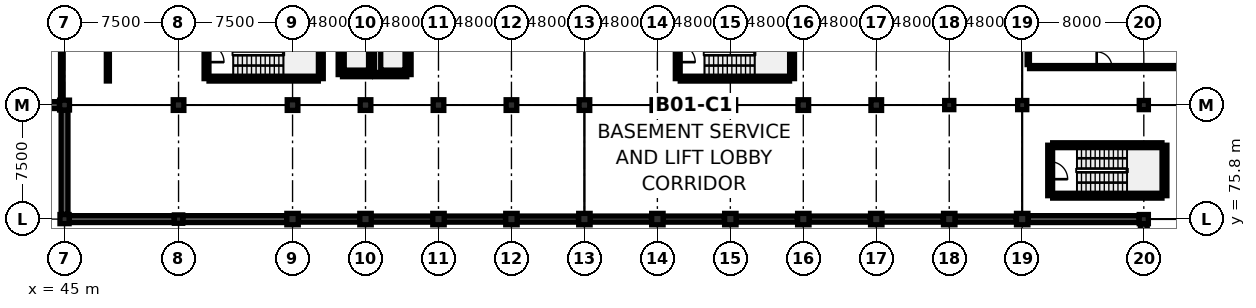
"""IFC4 building model, lengths in metres.
Left out: names, types, materials, properties, quantities, classifications, styles, units other than length and angle.
Written with IfcOpenShell. Run it as: python <this file> out.ifc"""

import sys

from ifc_helpers import new_model, si_unit, direction, frame, frame_2d, origin, origin_2d, place, context, subcontext, project, spatial, rectangle, circle, extrude, element, fill, save


model = new_model("IFC4")
c1 = context("Model", 3, precision=1e-05, world=origin(), true_north=direction((0.0, 1.0)))
c2 = subcontext(c1, "Body", "Model", "MODEL_VIEW")
j1 = project(units=[si_unit("LENGTHUNIT", "METRE"), si_unit("PLANEANGLEUNIT", "RADIAN")], contexts=[c1])
p1 = place(None, origin())
s1 = spatial("IfcSite", under=j1, at=p1, CompositionType="ELEMENT")
p2 = place(p1, origin())
s2 = spatial("IfcBuilding", under=s1, at=p2, CompositionType="ELEMENT")
p3 = place(p2, frame((0.0, 0.0, -4.2)))
s3 = spatial("IfcBuildingStorey", under=s2, at=p3, CompositionType="ELEMENT", Elevation=-4.2)
p4 = place(p3, frame((45.0, 75.8, 0.0), z_axis=(0.0, 0.0, 1.0), x_axis=(1.0, 0.0, 0.0)))
e1 = element("IfcColumn", 1, at=p4, inside=s3, PredefinedType="COLUMN", context=c2, shape_type="SweptSolid", body=[
    extrude(rectangle(XDim=0.6, YDim=0.6, at=origin_2d()), origin(), (0.0, 0.0, 1.0), 3.78),
])
p5 = place(p3, frame((45.0, 83.3, 0.0), z_axis=(0.0, 0.0, 1.0), x_axis=(1.0, 0.0, 0.0)))
e2 = element("IfcColumn", 2, at=p5, inside=s3, PredefinedType="COLUMN", context=c2, shape_type="SweptSolid", body=[
    extrude(rectangle(XDim=0.65, YDim=0.65, at=origin_2d()), origin(), (0.0, 0.0, 1.0), 3.78),
])
p6 = place(p3, frame((52.5, 75.8, 0.0), z_axis=(0.0, 0.0, 1.0), x_axis=(1.0, 0.0, 0.0)))
e3 = element("IfcColumn", 3, at=p6, inside=s3, PredefinedType="COLUMN", context=c2, shape_type="SweptSolid", body=[
    extrude(rectangle(XDim=0.55, YDim=0.55, at=origin_2d()), origin(), (0.0, 0.0, 1.0), 3.78),
])
p7 = place(p3, frame((52.5, 83.3, 0.0), z_axis=(0.0, 0.0, 1.0), x_axis=(1.0, 0.0, 0.0)))
e4 = element("IfcColumn", 4, at=p7, inside=s3, PredefinedType="COLUMN", context=c2, shape_type="SweptSolid", body=[
    extrude(rectangle(XDim=0.7, YDim=0.7, at=origin_2d()), origin(), (0.0, 0.0, 1.0), 3.78),
])
p8 = place(p3, frame((60.0, 75.8, 0.0), z_axis=(0.0, 0.0, 1.0), x_axis=(1.0, 0.0, 0.0)))
e5 = element("IfcColumn", 5, at=p8, inside=s3, PredefinedType="COLUMN", context=c2, shape_type="SweptSolid", body=[
    extrude(circle(Radius=0.375, at=origin_2d()), origin(), (0.0, 0.0, 1.0), 3.78),
])
p9 = place(p3, frame((60.0, 83.3, 0.0), z_axis=(0.0, 0.0, 1.0), x_axis=(1.0, 0.0, 0.0)))
e6 = element("IfcColumn", 6, at=p9, inside=s3, PredefinedType="COLUMN", context=c2, shape_type="SweptSolid", body=[
    extrude(rectangle(XDim=0.7, YDim=0.7, at=origin_2d()), origin(), (0.0, 0.0, 1.0), 3.78),
])
p10 = place(p3, frame((64.8, 75.8, 0.0), z_axis=(0.0, 0.0, 1.0), x_axis=(1.0, 0.0, 0.0)))
e7 = element("IfcColumn", 7, at=p10, inside=s3, PredefinedType="COLUMN", context=c2, shape_type="SweptSolid", body=[
    extrude(circle(Radius=0.375, at=origin_2d()), origin(), (0.0, 0.0, 1.0), 3.78),
])
p11 = place(p3, frame((64.8, 83.3, 0.0), z_axis=(0.0, 0.0, 1.0), x_axis=(1.0, 0.0, 0.0)))
e8 = element("IfcColumn", 8, at=p11, inside=s3, PredefinedType="COLUMN", context=c2, shape_type="SweptSolid", body=[
    extrude(rectangle(XDim=0.7, YDim=0.7, at=origin_2d()), origin(), (0.0, 0.0, 1.0), 3.78),
])
p12 = place(p3, frame((69.6, 75.8, 0.0), z_axis=(0.0, 0.0, 1.0), x_axis=(1.0, 0.0, 0.0)))
e9 = element("IfcColumn", 9, at=p12, inside=s3, PredefinedType="COLUMN", context=c2, shape_type="SweptSolid", body=[
    extrude(circle(Radius=0.375, at=origin_2d()), origin(), (0.0, 0.0, 1.0), 3.78),
])
p13 = place(p3, frame((69.6, 83.3, 0.0), z_axis=(0.0, 0.0, 1.0), x_axis=(1.0, 0.0, 0.0)))
e10 = element("IfcColumn", 10, at=p13, inside=s3, PredefinedType="COLUMN", context=c2, shape_type="SweptSolid", body=[
    extrude(rectangle(XDim=0.7, YDim=0.7, at=origin_2d()), origin(), (0.0, 0.0, 1.0), 3.78),
])
p14 = place(p3, frame((74.4, 75.8, 0.0), z_axis=(0.0, 0.0, 1.0), x_axis=(1.0, 0.0, 0.0)))
e11 = element("IfcColumn", 11, at=p14, inside=s3, PredefinedType="COLUMN", context=c2, shape_type="SweptSolid", body=[
    extrude(circle(Radius=0.375, at=origin_2d()), origin(), (0.0, 0.0, 1.0), 3.78),
])
p15 = place(p3, frame((74.4, 83.3, 0.0), z_axis=(0.0, 0.0, 1.0), x_axis=(1.0, 0.0, 0.0)))
e12 = element("IfcColumn", 12, at=p15, inside=s3, PredefinedType="COLUMN", context=c2, shape_type="SweptSolid", body=[
    extrude(rectangle(XDim=0.7, YDim=0.7, at=origin_2d()), origin(), (0.0, 0.0, 1.0), 3.78),
])
p16 = place(p3, frame((79.2, 75.8, 0.0), z_axis=(0.0, 0.0, 1.0), x_axis=(1.0, 0.0, 0.0)))
e13 = element("IfcColumn", 13, at=p16, inside=s3, PredefinedType="COLUMN", context=c2, shape_type="SweptSolid", body=[
    extrude(circle(Radius=0.375, at=origin_2d()), origin(), (0.0, 0.0, 1.0), 3.78),
])
p17 = place(p3, frame((79.2, 83.3, 0.0), z_axis=(0.0, 0.0, 1.0), x_axis=(1.0, 0.0, 0.0)))
e14 = element("IfcColumn", 14, at=p17, inside=s3, PredefinedType="COLUMN", context=c2, shape_type="SweptSolid", body=[
    extrude(rectangle(XDim=0.7, YDim=0.7, at=origin_2d()), origin(), (0.0, 0.0, 1.0), 3.78),
])
p18 = place(p3, frame((84.0, 75.8, 0.0), z_axis=(0.0, 0.0, 1.0), x_axis=(1.0, 0.0, 0.0)))
e15 = element("IfcColumn", 15, at=p18, inside=s3, PredefinedType="COLUMN", context=c2, shape_type="SweptSolid", body=[
    extrude(circle(Radius=0.375, at=origin_2d()), origin(), (0.0, 0.0, 1.0), 3.78),
])
p19 = place(p3, frame((84.0, 83.3, 0.0), z_axis=(0.0, 0.0, 1.0), x_axis=(1.0, 0.0, 0.0)))
e16 = element("IfcColumn", 16, at=p19, inside=s3, PredefinedType="COLUMN", context=c2, shape_type="SweptSolid", body=[
    extrude(rectangle(XDim=0.7, YDim=0.7, at=origin_2d()), origin(), (0.0, 0.0, 1.0), 3.78),
])
p20 = place(p3, frame((88.8, 75.8, 0.0), z_axis=(0.0, 0.0, 1.0), x_axis=(1.0, 0.0, 0.0)))
e17 = element("IfcColumn", 17, at=p20, inside=s3, PredefinedType="COLUMN", context=c2, shape_type="SweptSolid", body=[
    extrude(circle(Radius=0.375, at=origin_2d()), origin(), (0.0, 0.0, 1.0), 3.78),
])
p21 = place(p3, frame((88.8, 83.3, 0.0), z_axis=(0.0, 0.0, 1.0), x_axis=(1.0, 0.0, 0.0)))
e18 = element("IfcColumn", 18, at=p21, inside=s3, PredefinedType="COLUMN", context=c2, shape_type="SweptSolid", body=[
    extrude(rectangle(XDim=0.7, YDim=0.7, at=origin_2d()), origin(), (0.0, 0.0, 1.0), 3.78),
])
p22 = place(p3, frame((93.6, 75.8, 0.0), z_axis=(0.0, 0.0, 1.0), x_axis=(1.0, 0.0, 0.0)))
e19 = element("IfcColumn", 19, at=p22, inside=s3, PredefinedType="COLUMN", context=c2, shape_type="SweptSolid", body=[
    extrude(circle(Radius=0.375, at=origin_2d()), origin(), (0.0, 0.0, 1.0), 3.78),
])
p23 = place(p3, frame((93.6, 83.3, 0.0), z_axis=(0.0, 0.0, 1.0), x_axis=(1.0, 0.0, 0.0)))
e20 = element("IfcColumn", 20, at=p23, inside=s3, PredefinedType="COLUMN", context=c2, shape_type="SweptSolid", body=[
    extrude(rectangle(XDim=0.7, YDim=0.7, at=origin_2d()), origin(), (0.0, 0.0, 1.0), 3.78),
])
p24 = place(p3, frame((98.4, 75.8, 0.0), z_axis=(0.0, 0.0, 1.0), x_axis=(1.0, 0.0, 0.0)))
e21 = element("IfcColumn", 21, at=p24, inside=s3, PredefinedType="COLUMN", context=c2, shape_type="SweptSolid", body=[
    extrude(circle(Radius=0.375, at=origin_2d()), origin(), (0.0, 0.0, 1.0), 3.78),
])
p25 = place(p3, frame((98.4, 83.3, 0.0), z_axis=(0.0, 0.0, 1.0), x_axis=(1.0, 0.0, 0.0)))
e22 = element("IfcColumn", 22, at=p25, inside=s3, PredefinedType="COLUMN", context=c2, shape_type="SweptSolid", body=[
    extrude(rectangle(XDim=0.7, YDim=0.7, at=origin_2d()), origin(), (0.0, 0.0, 1.0), 3.78),
])
p26 = place(p3, frame((103.2, 75.8, 0.0), z_axis=(0.0, 0.0, 1.0), x_axis=(1.0, 0.0, 0.0)))
e23 = element("IfcColumn", 23, at=p26, inside=s3, PredefinedType="COLUMN", context=c2, shape_type="SweptSolid", body=[
    extrude(circle(Radius=0.375, at=origin_2d()), origin(), (0.0, 0.0, 1.0), 3.78),
])
p27 = place(p3, frame((103.2, 83.3, 0.0), z_axis=(0.0, 0.0, 1.0), x_axis=(1.0, 0.0, 0.0)))
e24 = element("IfcColumn", 24, at=p27, inside=s3, PredefinedType="COLUMN", context=c2, shape_type="SweptSolid", body=[
    extrude(rectangle(XDim=0.6, YDim=0.6, at=origin_2d()), origin(), (0.0, 0.0, 1.0), 3.78),
])
p28 = place(p3, frame((108.0, 75.8, 0.0), z_axis=(0.0, 0.0, 1.0), x_axis=(1.0, 0.0, 0.0)))
e25 = element("IfcColumn", 25, at=p28, inside=s3, PredefinedType="COLUMN", context=c2, shape_type="SweptSolid", body=[
    extrude(circle(Radius=0.375, at=origin_2d()), origin(), (0.0, 0.0, 1.0), 3.78),
])
for number, where, z_axis, x_axis in (
    (26, (108.0, 83.3, 0.0), (0.0, 0.0, 1.0), (1.0, 0.0, 0.0)),
    (27, (116.0, 75.8, 0.0), (0.0, 0.0, 1.0), (1.0, 0.0, 0.0)),
):
    element("IfcColumn", number, at=place(p3, frame(where, z_axis=z_axis, x_axis=x_axis)), inside=s3, PredefinedType="COLUMN", context=c2, shape_type="SweptSolid", body=[
        extrude(rectangle(XDim=0.6, YDim=0.6, at=origin_2d()), origin(), (0.0, 0.0, 1.0), 3.78),
    ])
p29 = place(p3, frame((116.0, 83.3, 0.0), z_axis=(0.0, 0.0, 1.0), x_axis=(1.0, 0.0, 0.0)))
e28 = element("IfcColumn", 28, at=p29, inside=s3, PredefinedType="COLUMN", context=c2, shape_type="SweptSolid", body=[
    extrude(rectangle(XDim=0.6, YDim=0.6, at=origin_2d()), origin(), (0.0, 0.0, 1.0), 3.75),
])
p30 = place(p3, frame((116.0, 68.585, 0.0), z_axis=(0.0, 0.0, 1.0), x_axis=(0.0, 1.0, 0.0)))
e29 = element("IfcWall", 29, at=p30, inside=s3, PredefinedType="USERDEFINED", context=c2, shape_type="SweptSolid", body=[
    extrude(rectangle(XDim=6.905, YDim=0.45, at=frame_2d((3.453, 0.0))), origin(), (0.0, 0.0, 1.0), 3.13),
])
p31 = place(p3, frame((115.69, 75.8, 0.0), z_axis=(0.0, 0.0, 1.0), x_axis=(-1.0, 0.0, 0.0)))
e30 = element("IfcWall", 30, at=p31, inside=s3, PredefinedType="USERDEFINED", context=c2, shape_type="SweptSolid", body=[
    extrude(rectangle(XDim=7.305, YDim=0.45, at=frame_2d((3.652, 0.0))), origin(), (0.0, 0.0, 1.0), 3.08),
])
for number, where, z_axis, x_axis in (
    (31, (107.615, 75.8, 0.0), (0.0, 0.0, 1.0), (-1.0, 0.0, 0.0)),
    (32, (102.815, 75.8, 0.0), (0.0, 0.0, 1.0), (-1.0, 0.0, 0.0)),
):
    element("IfcWall", number, at=place(p3, frame(where, z_axis=z_axis, x_axis=x_axis)), inside=s3, PredefinedType="USERDEFINED", context=c2, shape_type="SweptSolid", body=[
        extrude(rectangle(XDim=4.03, YDim=0.4, at=frame_2d((2.015, 0.0))), origin(), (0.0, 0.0, 1.0), 3.18),
    ])
p32 = place(p3, frame((98.015, 75.8, 0.0), z_axis=(0.0, 0.0, 1.0), x_axis=(-1.0, 0.0, 0.0)))
e33 = element("IfcWall", 33, at=p32, inside=s3, PredefinedType="USERDEFINED", context=c2, shape_type="SweptSolid", body=[
    extrude(rectangle(XDim=4.03, YDim=0.4, at=frame_2d((2.015, 0.0))), origin(), (0.0, 0.0, 1.0), 3.18),
])
for number, where, z_axis, x_axis in (
    (34, (93.215, 75.8, 0.0), (0.0, 0.0, 1.0), (-1.0, 0.0, 0.0)),
    (35, (88.415, 75.8, 0.0), (0.0, 0.0, 1.0), (-1.0, 0.0, 0.0)),
    (36, (83.615, 75.8, 0.0), (0.0, 0.0, 1.0), (-1.0, 0.0, 0.0)),
    (37, (78.815, 75.8, 0.0), (0.0, 0.0, 1.0), (-1.0, 0.0, 0.0)),
):
    element("IfcWall", number, at=place(p3, frame(where, z_axis=z_axis, x_axis=x_axis)), inside=s3, PredefinedType="USERDEFINED", context=c2, shape_type="SweptSolid", body=[
        extrude(rectangle(XDim=4.03, YDim=0.4, at=frame_2d((2.015, 0.0))), origin(), (0.0, 0.0, 1.0), 3.18),
    ])
p33 = place(p3, frame((74.015, 75.8, 0.0), z_axis=(0.0, 0.0, 1.0), x_axis=(-1.0, 0.0, 0.0)))
e38 = element("IfcWall", 38, at=p33, inside=s3, PredefinedType="USERDEFINED", context=c2, shape_type="SweptSolid", body=[
    extrude(rectangle(XDim=4.03, YDim=0.4, at=frame_2d((2.015, 0.0))), origin(), (0.0, 0.0, 1.0), 3.18),
])
for number, where, z_axis, x_axis in (
    (39, (69.215, 75.8, 0.0), (0.0, 0.0, 1.0), (-1.0, 0.0, 0.0)),
    (40, (64.415, 75.8, 0.0), (0.0, 0.0, 1.0), (-1.0, 0.0, 0.0)),
):
    element("IfcWall", number, at=place(p3, frame(where, z_axis=z_axis, x_axis=x_axis)), inside=s3, PredefinedType="USERDEFINED", context=c2, shape_type="SweptSolid", body=[
        extrude(rectangle(XDim=4.03, YDim=0.4, at=frame_2d((2.015, 0.0))), origin(), (0.0, 0.0, 1.0), 3.18),
    ])
p34 = place(p3, frame((59.615, 75.8, 0.0), z_axis=(0.0, 0.0, 1.0), x_axis=(-1.0, 0.0, 0.0)))
e41 = element("IfcWall", 41, at=p34, inside=s3, PredefinedType="USERDEFINED", context=c2, shape_type="SweptSolid", body=[
    extrude(rectangle(XDim=6.83, YDim=0.45, at=frame_2d((3.415, 0.0))), origin(), (0.0, 0.0, 1.0), 3.13),
])
p35 = place(p3, frame((52.215, 75.8, 0.0), z_axis=(0.0, 0.0, 1.0), x_axis=(-1.0, 0.0, 0.0)))
e42 = element("IfcWall", 42, at=p35, inside=s3, PredefinedType="USERDEFINED", context=c2, shape_type="SweptSolid", body=[
    extrude(rectangle(XDim=6.905, YDim=0.45, at=frame_2d((3.453, 0.0))), origin(), (0.0, 0.0, 1.0), 3.13),
])
p36 = place(p3, frame((45.0, 76.11, 0.0), z_axis=(0.0, 0.0, 1.0), x_axis=(0.0, 1.0, 0.0)))
e43 = element("IfcWall", 43, at=p36, inside=s3, PredefinedType="USERDEFINED", context=c2, shape_type="SweptSolid", body=[
    extrude(rectangle(XDim=6.855, YDim=0.45, at=frame_2d((3.427, 0.0))), origin(), (0.0, 0.0, 1.0), 3.13),
])
p37 = place(p3, frame((44.665, 83.3, 0.0), z_axis=(0.0, 0.0, 1.0), x_axis=(-1.0, 0.0, 0.0)))
e44 = element("IfcWall", 44, at=p37, inside=s3, PredefinedType="USERDEFINED", context=c2, shape_type="SweptSolid", body=[
    extrude(rectangle(XDim=6.88, YDim=0.45, at=frame_2d((3.44, 0.0))), origin(), (0.0, 0.0, 1.0), 3.13),
])
p38 = place(p3, frame((54.505, 85.04, 0.0), z_axis=(0.0, 0.0, 1.0), x_axis=(1.0, 0.0, 0.0)))
e45 = element("IfcWall", 45, at=p38, inside=s3, PredefinedType="SHEAR", context=c2, shape_type="SweptSolid", body=[
    extrude(rectangle(XDim=7.19, YDim=0.32, at=frame_2d((3.595, 0.0))), origin(), (0.0, 0.0, 1.0), 3.78),
])
p39 = place(p3, frame((61.86, 85.04, 0.0), z_axis=(0.0, 0.0, 1.0), x_axis=(0.0, 1.0, 0.0)))
e46 = element("IfcWall", 46, at=p39, inside=s3, PredefinedType="SHEAR", context=c2, shape_type="SweptSolid", body=[
    extrude(rectangle(XDim=3.32, YDim=0.32, at=frame_2d((1.66, 0.0))), origin(), (0.0, 0.0, 1.0), 3.78),
])
p40 = place(p3, frame((54.34, 88.36, 0.0), z_axis=(0.0, 0.0, 1.0), x_axis=(0.0, -1.0, 0.0)))
e47 = element("IfcWall", 47, at=p40, inside=s3, PredefinedType="SHEAR", context=c2, shape_type="SweptSolid", body=[
    extrude(rectangle(XDim=3.32, YDim=0.32, at=frame_2d((1.66, 0.0))), origin(), (0.0, 0.0, 1.0), 3.78),
])
p41 = place(p40, frame((1.085, 0.0, 0.0)))
e48 = element("IfcOpeningElement", 48, at=p41, cuts=e47, PredefinedType="OPENING", context=c2, shape_type="SweptSolid", body=[
    extrude(rectangle(XDim=1.15, YDim=2.15, at=frame_2d((0.575, 1.075))), frame((0.0, 0.172, 0.0), z_axis=(0.0, -1.0, 0.0), x_axis=(1.0, 0.0, 0.0)), (0.0, 0.0, 1.0), 0.344),
])
p42 = place(p3, frame((63.286, 85.307, 0.0), z_axis=(0.0, 0.0, 1.0), x_axis=(1.0, 0.0, 0.0)))
e49 = element("IfcWall", 49, at=p42, inside=s3, PredefinedType="SHEAR", context=c2, shape_type="SweptSolid", body=[
    extrude(rectangle(XDim=1.828, YDim=0.28, at=frame_2d((0.914, 0.0))), origin(), (0.0, 0.0, 1.0), 3.78),
])
for number, where, z_axis, x_axis in (
    (50, (65.259, 85.307, 0.0), (0.0, 0.0, 1.0), (0.0, 1.0, 0.0)),
    (51, (63.141, 88.093, 0.0), (0.0, 0.0, 1.0), (0.0, -1.0, 0.0)),
):
    element("IfcWall", number, at=place(p3, frame(where, z_axis=z_axis, x_axis=x_axis)), inside=s3, PredefinedType="SHEAR", context=c2, shape_type="SweptSolid", body=[
        extrude(rectangle(XDim=2.787, YDim=0.28, at=frame_2d((1.393, 0.0))), origin(), (0.0, 0.0, 1.0), 3.78),
    ])
p43 = place(p3, frame((65.404, 85.307, 0.0), z_axis=(0.0, 0.0, 1.0), x_axis=(1.0, 0.0, 0.0)))
e52 = element("IfcWall", 52, at=p43, inside=s3, PredefinedType="SHEAR", context=c2, shape_type="SweptSolid", body=[
    extrude(rectangle(XDim=2.11, YDim=0.28, at=frame_2d((1.055, 0.0))), origin(), (0.0, 0.0, 1.0), 3.78),
])
p44 = place(p3, frame((67.659, 85.307, 0.0), z_axis=(0.0, 0.0, 1.0), x_axis=(0.0, 1.0, 0.0)))
e53 = element("IfcWall", 53, at=p44, inside=s3, PredefinedType="SHEAR", context=c2, shape_type="SweptSolid", body=[
    extrude(rectangle(XDim=2.787, YDim=0.28, at=frame_2d((1.393, 0.0))), origin(), (0.0, 0.0, 1.0), 3.78),
])
p45 = place(p3, frame((85.505, 85.04, 0.0), z_axis=(0.0, 0.0, 1.0), x_axis=(1.0, 0.0, 0.0)))
e54 = element("IfcWall", 54, at=p45, inside=s3, PredefinedType="SHEAR", context=c2, shape_type="SweptSolid", body=[
    extrude(rectangle(XDim=7.19, YDim=0.32, at=frame_2d((3.595, 0.0))), origin(), (0.0, 0.0, 1.0), 3.78),
])
p46 = place(p3, frame((92.86, 85.04, 0.0), z_axis=(0.0, 0.0, 1.0), x_axis=(0.0, 1.0, 0.0)))
e55 = element("IfcWall", 55, at=p46, inside=s3, PredefinedType="SHEAR", context=c2, shape_type="SweptSolid", body=[
    extrude(rectangle(XDim=3.32, YDim=0.32, at=frame_2d((1.66, 0.0))), origin(), (0.0, 0.0, 1.0), 3.78),
])
p47 = place(p3, frame((85.34, 88.36, 0.0), z_axis=(0.0, 0.0, 1.0), x_axis=(0.0, -1.0, 0.0)))
e56 = element("IfcWall", 56, at=p47, inside=s3, PredefinedType="SHEAR", context=c2, shape_type="SweptSolid", body=[
    extrude(rectangle(XDim=3.32, YDim=0.32, at=frame_2d((1.66, 0.0))), origin(), (0.0, 0.0, 1.0), 3.78),
])
p48 = place(p47, frame((1.085, 0.0, 0.0)))
e57 = element("IfcOpeningElement", 57, at=p48, cuts=e56, PredefinedType="OPENING", context=c2, shape_type="SweptSolid", body=[
    extrude(rectangle(XDim=1.15, YDim=2.15, at=frame_2d((0.575, 1.075))), frame((0.0, 0.172, 0.0), z_axis=(0.0, -1.0, 0.0), x_axis=(1.0, 0.0, 0.0)), (0.0, 0.0, 1.0), 0.344),
])
p49 = place(p3, frame((110.005, 77.34, 0.0), z_axis=(0.0, 0.0, 1.0), x_axis=(1.0, 0.0, 0.0)))
e58 = element("IfcWall", 58, at=p49, inside=s3, PredefinedType="SHEAR", context=c2, shape_type="SweptSolid", body=[
    extrude(rectangle(XDim=7.19, YDim=0.32, at=frame_2d((3.595, 0.0))), origin(), (0.0, 0.0, 1.0), 3.78),
])
p50 = place(p3, frame((117.36, 77.34, 0.0), z_axis=(0.0, 0.0, 1.0), x_axis=(0.0, 1.0, 0.0)))
e59 = element("IfcWall", 59, at=p50, inside=s3, PredefinedType="SHEAR", context=c2, shape_type="SweptSolid", body=[
    extrude(rectangle(XDim=3.32, YDim=0.32, at=frame_2d((1.66, 0.0))), origin(), (0.0, 0.0, 1.0), 3.78),
])
p51 = place(p3, frame((117.195, 80.66, 0.0), z_axis=(0.0, 0.0, 1.0), x_axis=(-1.0, 0.0, 0.0)))
e60 = element("IfcWall", 60, at=p51, inside=s3, PredefinedType="SHEAR", context=c2, shape_type="SweptSolid", body=[
    extrude(rectangle(XDim=7.19, YDim=0.32, at=frame_2d((3.595, 0.0))), origin(), (0.0, 0.0, 1.0), 3.78),
])
p52 = place(p3, frame((109.84, 80.66, 0.0), z_axis=(0.0, 0.0, 1.0), x_axis=(0.0, -1.0, 0.0)))
e61 = element("IfcWall", 61, at=p52, inside=s3, PredefinedType="SHEAR", context=c2, shape_type="SweptSolid", body=[
    extrude(rectangle(XDim=3.32, YDim=0.32, at=frame_2d((1.66, 0.0))), origin(), (0.0, 0.0, 1.0), 3.78),
])
p53 = place(p52, frame((1.085, 0.0, 0.0)))
e62 = element("IfcOpeningElement", 62, at=p53, cuts=e61, PredefinedType="OPENING", context=c2, shape_type="SweptSolid", body=[
    extrude(rectangle(XDim=1.15, YDim=2.15, at=frame_2d((0.575, 1.075))), frame((0.0, 0.172, 0.0), z_axis=(0.0, -1.0, 0.0), x_axis=(1.0, 0.0, 0.0)), (0.0, 0.0, 1.0), 0.344),
])
p54 = place(p3, frame((47.85, 84.885, 0.0), z_axis=(0.0, 0.0, 1.0), x_axis=(0.0, 1.0, 0.0)))
e63 = element("IfcWall", 63, at=p54, inside=s3, PredefinedType="PARTITIONING", context=c2, shape_type="SweptSolid", body=[
    extrude(rectangle(XDim=12.63, YDim=0.2, at=frame_2d((6.315, 0.0))), origin(), (0.0, 0.0, 1.0), 3.065),
])
p55 = place(p54, frame((5.815, 0.0, 0.0)))
e64 = element("IfcOpeningElement", 64, at=p55, cuts=e63, PredefinedType="OPENING", context=c2, shape_type="SweptSolid", body=[
    extrude(rectangle(XDim=1.0, YDim=2.15, at=frame_2d((0.5, 1.075))), frame((0.0, 0.112, 0.0), z_axis=(0.0, -1.0, 0.0), x_axis=(1.0, 0.0, 0.0)), (0.0, 0.0, 1.0), 0.224),
])
p56 = place(p3, frame((108.485, 85.8, 0.0), z_axis=(0.0, 0.0, 1.0), x_axis=(1.0, 0.0, 0.0)))
e65 = element("IfcWall", 65, at=p56, inside=s3, PredefinedType="PARTITIONING", context=c2, shape_type="SweptSolid", body=[
    extrude(rectangle(XDim=9.83, YDim=0.2, at=frame_2d((4.915, 0.0))), origin(), (0.0, 0.0, 1.0), 3.035),
])
p57 = place(p56, frame((4.415, 0.0, 0.0)))
e66 = element("IfcOpeningElement", 66, at=p57, cuts=e65, PredefinedType="OPENING", context=c2, shape_type="SweptSolid", body=[
    extrude(rectangle(XDim=1.0, YDim=2.15, at=frame_2d((0.5, 1.075))), frame((0.0, 0.112, 0.0), z_axis=(0.0, -1.0, 0.0), x_axis=(1.0, 0.0, 0.0)), (0.0, 0.0, 1.0), 0.224),
])
p58 = place(p3, frame((44.8, 83.637, 0.0), z_axis=(0.0, 0.0, 1.0), x_axis=(0.0, 1.0, 0.0)))
e67 = element("IfcWall", 67, at=p58, inside=s3, PredefinedType="PARTITIONING", context=c2, shape_type="SweptSolid", body=[
    extrude(rectangle(XDim=10.998, YDim=0.125, at=frame_2d((5.499, 0.0))), origin(), (0.0, 0.0, 1.0), 3.065),
])
p59 = place(p3, frame((108.4, 85.965, 0.0), z_axis=(0.0, 0.0, 1.0), x_axis=(0.0, 1.0, 0.0)))
e68 = element("IfcWall", 68, at=p59, inside=s3, PredefinedType="PARTITIONING", context=c2, shape_type="SweptSolid", body=[
    extrude(rectangle(XDim=12.343, YDim=0.15, at=frame_2d((6.171, 0.0))), origin(), (0.0, 0.0, 1.0), 2.935),
])
p60 = place(p41, origin())
e69 = element("IfcDoor", 69, at=p60, inside=s3, OperationType="SINGLE_SWING_RIGHT", PredefinedType="DOOR", context=c2, shape_type="SweptSolid", body=[
    extrude(rectangle(XDim=1.15, YDim=2.15, at=frame_2d((0.575, 1.075))), frame((0.0, 0.025, 0.0), z_axis=(0.0, -1.0, 0.0), x_axis=(1.0, 0.0, 0.0)), (0.0, 0.0, 1.0), 0.05),
])
fill(e48, e69)
p61 = place(p48, origin())
e70 = element("IfcDoor", 70, at=p61, inside=s3, OperationType="SINGLE_SWING_RIGHT", PredefinedType="DOOR", context=c2, shape_type="SweptSolid", body=[
    extrude(rectangle(XDim=1.15, YDim=2.15, at=frame_2d((0.575, 1.075))), frame((0.0, 0.025, 0.0), z_axis=(0.0, -1.0, 0.0), x_axis=(1.0, 0.0, 0.0)), (0.0, 0.0, 1.0), 0.05),
])
fill(e57, e70)
p62 = place(p53, origin())
e71 = element("IfcDoor", 71, at=p62, inside=s3, OperationType="SINGLE_SWING_RIGHT", PredefinedType="DOOR", context=c2, shape_type="SweptSolid", body=[
    extrude(rectangle(XDim=1.15, YDim=2.15, at=frame_2d((0.575, 1.075))), frame((0.0, 0.025, 0.0), z_axis=(0.0, -1.0, 0.0), x_axis=(1.0, 0.0, 0.0)), (0.0, 0.0, 1.0), 0.05),
])
fill(e62, e71)
p63 = place(p57, origin())
e72 = element("IfcDoor", 72, at=p63, inside=s3, OperationType="SINGLE_SWING_LEFT", PredefinedType="DOOR", context=c2, shape_type="SweptSolid", body=[
    extrude(rectangle(XDim=1.0, YDim=2.15, at=frame_2d((0.5, 1.075))), frame((0.0, 0.025, 0.0), z_axis=(0.0, -1.0, 0.0), x_axis=(1.0, 0.0, 0.0)), (0.0, 0.0, 1.0), 0.05),
])
fill(e66, e72)
save(model, sys.argv[1])
